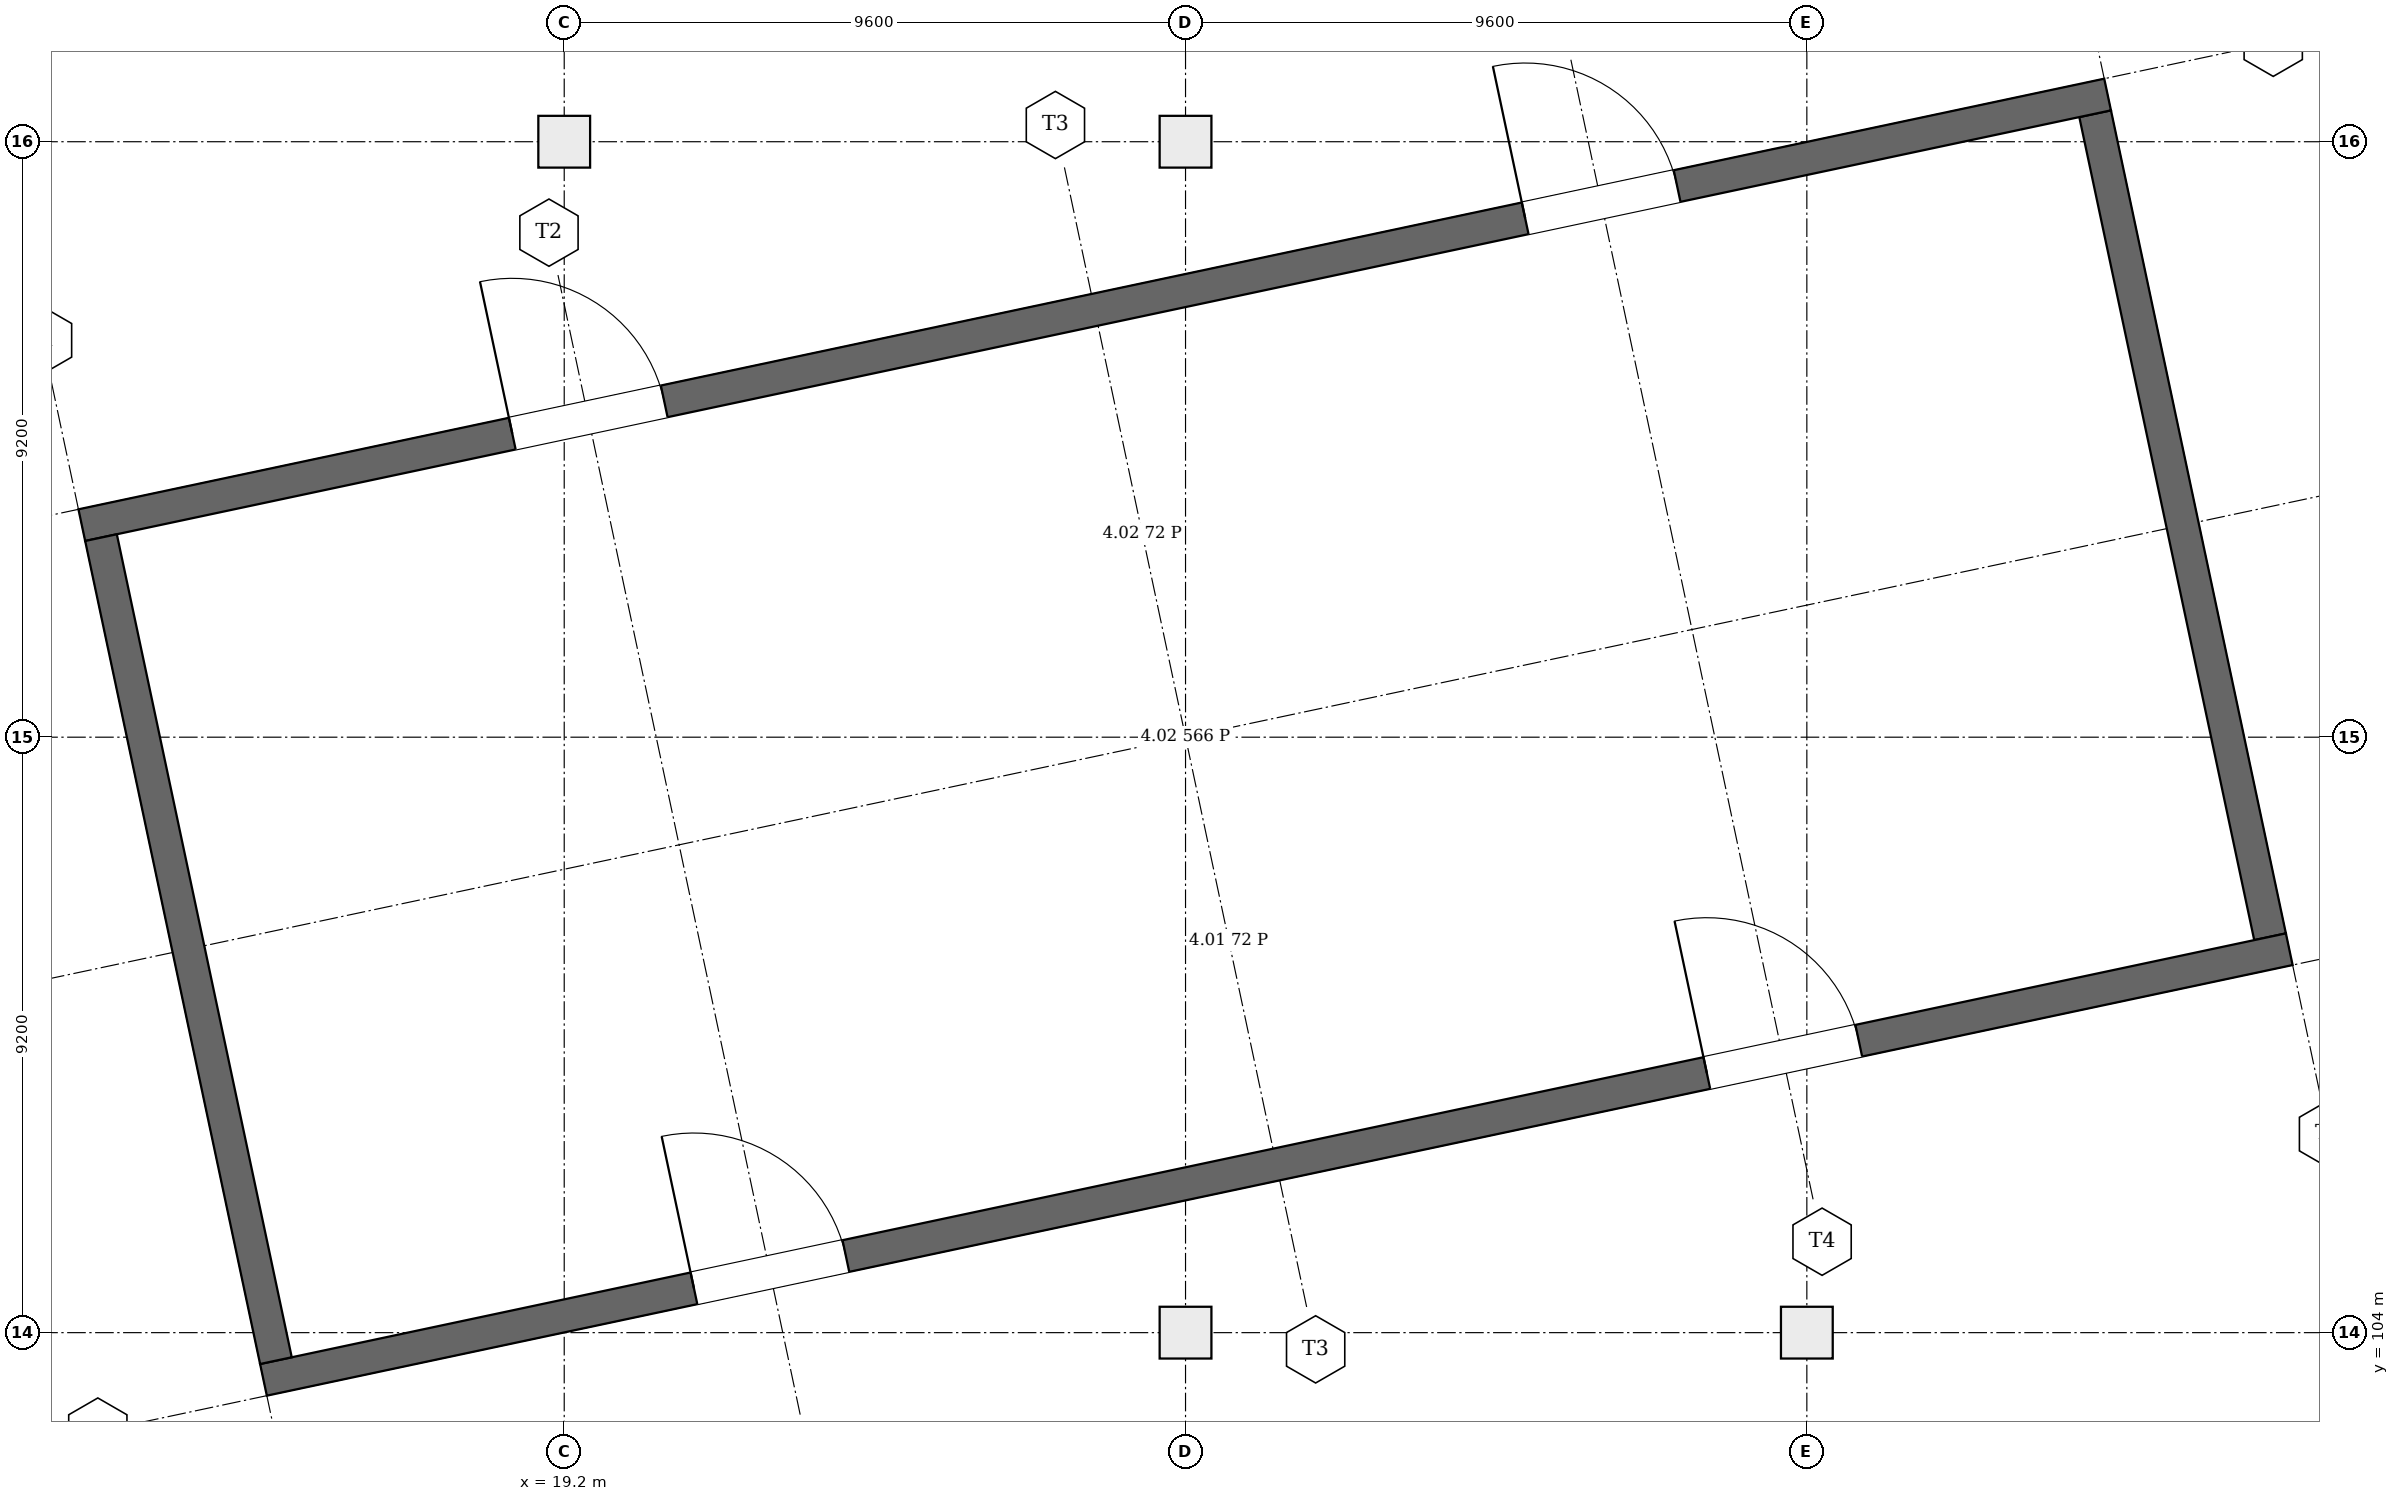
"""IFC4 building model, lengths in metres.
Left out: names, types, materials, properties, quantities, classifications, styles, units other than length and angle.
Written with IfcOpenShell. Run it as: python <this file> out.ifc"""

import sys

from ifc_helpers import new_model, si_unit, direction, frame, frame_2d, origin, origin_2d, place, context, subcontext, project, spatial, rectangle, extrude, element, fill, save


model = new_model("IFC4")
c1 = context("Model", 3, precision=1e-05, world=origin(), true_north=direction((0.0, 1.0)))
c2 = subcontext(c1, "Body", "Model", "MODEL_VIEW")
j1 = project(units=[si_unit("LENGTHUNIT", "METRE"), si_unit("PLANEANGLEUNIT", "RADIAN")], contexts=[c1])
p1 = place(None, origin())
s1 = spatial("IfcSite", under=j1, at=p1, CompositionType="ELEMENT")
p2 = place(p1, origin())
s2 = spatial("IfcBuilding", under=s1, at=p2, CompositionType="ELEMENT")
p3 = place(p2, frame((0.0, 0.0, 26.7)))
s3 = spatial("IfcBuildingStorey", under=s2, at=p3, CompositionType="ELEMENT", Elevation=26.7)
p4 = place(p3, frame((14.553, 103.271, 0.0), z_axis=(0.0, 0.0, 1.0), x_axis=(0.978148301511, 0.207908393895, 0.0)))
e1 = element("IfcWall", 1, at=p4, inside=s3, PredefinedType="SHEAR", context=c2, shape_type="SweptSolid", body=[
    extrude(rectangle(XDim=32.0, YDim=0.5, at=frame_2d((16.0, 0.0))), origin(), (0.0, 0.0, 1.0), 5.2),
])
p5 = place(p4, frame((6.8, 0.0, 0.0)))
e2 = element("IfcOpeningElement", 2, at=p5, cuts=e1, PredefinedType="OPENING", context=c2, shape_type="SweptSolid", body=[
    extrude(rectangle(XDim=2.4, YDim=2.4, at=frame_2d((1.2, 1.2))), frame((0.0, 0.26, 0.0), z_axis=(0.0, -1.0, 0.0), x_axis=(1.0, 0.0, 0.0)), (0.0, 0.0, 1.0), 0.52),
])
p6 = place(p4, frame((22.8, 0.0, 0.0)))
e3 = element("IfcOpeningElement", 3, at=p6, cuts=e1, PredefinedType="OPENING", context=c2, shape_type="SweptSolid", body=[
    extrude(rectangle(XDim=2.4, YDim=2.4, at=frame_2d((1.2, 1.2))), frame((0.0, 0.26, 0.0), z_axis=(0.0, -1.0, 0.0), x_axis=(1.0, 0.0, 0.0)), (0.0, 0.0, 1.0), 0.52),
])
p7 = place(p3, frame((11.746, 116.476, 0.0), z_axis=(0.0, 0.0, 1.0), x_axis=(0.978146420121, 0.207917245089, 0.0)))
e4 = element("IfcWall", 4, at=p7, inside=s3, PredefinedType="SHEAR", context=c2, shape_type="SweptSolid", body=[
    extrude(rectangle(XDim=32.0, YDim=0.5, at=frame_2d((16.0, 0.0))), origin(), (0.0, 0.0, 1.0), 5.2),
])
p8 = place(p7, frame((6.8, 0.0, 0.0)))
e5 = element("IfcOpeningElement", 5, at=p8, cuts=e4, PredefinedType="OPENING", context=c2, shape_type="SweptSolid", body=[
    extrude(rectangle(XDim=2.4, YDim=2.4, at=frame_2d((1.2, 1.2))), frame((0.0, 0.26, 0.0), z_axis=(0.0, -1.0, 0.0), x_axis=(1.0, 0.0, 0.0)), (0.0, 0.0, 1.0), 0.52),
])
p9 = place(p7, frame((22.8, 0.0, 0.0)))
e6 = element("IfcOpeningElement", 6, at=p9, cuts=e4, PredefinedType="OPENING", context=c2, shape_type="SweptSolid", body=[
    extrude(rectangle(XDim=2.4, YDim=2.4, at=frame_2d((1.2, 1.2))), frame((0.0, 0.26, 0.0), z_axis=(0.0, -1.0, 0.0), x_axis=(1.0, 0.0, 0.0)), (0.0, 0.0, 1.0), 0.52),
])
p10 = place(p3, frame((14.746, 103.567, 0.0), z_axis=(0.0, 0.0, 1.0), x_axis=(-0.207911537827, 0.978147633253, 0.0)))
e7 = element("IfcWall", 7, at=p10, inside=s3, PredefinedType="SHEAR", context=c2, shape_type="SweptSolid", body=[
    extrude(rectangle(XDim=13.0, YDim=0.5, at=frame_2d((6.5, 0.0))), origin(), (0.0, 0.0, 1.0), 5.2),
])
p11 = place(p3, frame((45.557, 110.117, 0.0), z_axis=(0.0, 0.0, 1.0), x_axis=(-0.207915357117, 0.978146821431, 0.0)))
e8 = element("IfcWall", 8, at=p11, inside=s3, PredefinedType="SHEAR", context=c2, shape_type="SweptSolid", body=[
    extrude(rectangle(XDim=13.0, YDim=0.5, at=frame_2d((6.5, 0.0))), origin(), (0.0, 0.0, 1.0), 5.2),
])
for number, where, z_axis, x_axis in (
    (9, (28.8, 104.0, 0.0), (0.0, 0.0, 1.0), (1.0, 0.0, 0.0)),
    (10, (38.4, 104.0, 0.0), (0.0, 0.0, 1.0), (1.0, 0.0, 0.0)),
    (11, (19.2, 122.4, 0.0), (0.0, 0.0, 1.0), (1.0, 0.0, 0.0)),
    (12, (28.8, 122.4, 0.0), (0.0, 0.0, 1.0), (1.0, 0.0, 0.0)),
):
    element("IfcColumn", number, at=place(p3, frame(where, z_axis=z_axis, x_axis=x_axis)), inside=s3, PredefinedType="COLUMN", context=c2, shape_type="SweptSolid", body=[
        extrude(rectangle(XDim=0.8, YDim=0.8, at=origin_2d()), origin(), (0.0, 0.0, 1.0), 5.2),
    ])
p12 = place(p5, origin())
e13 = element("IfcDoor", 13, at=p12, inside=s3, OperationType="DOUBLE_DOOR_SINGLE_SWING", PredefinedType="DOOR", context=c2, shape_type="SweptSolid", body=[
    extrude(rectangle(XDim=2.4, YDim=2.4, at=frame_2d((1.2, 1.2))), frame((0.0, 0.025, 0.0), z_axis=(0.0, -1.0, 0.0), x_axis=(1.0, 0.0, 0.0)), (0.0, 0.0, 1.0), 0.05),
])
fill(e2, e13)
p13 = place(p8, origin())
e14 = element("IfcDoor", 14, at=p13, inside=s3, OperationType="DOUBLE_DOOR_SINGLE_SWING", PredefinedType="DOOR", context=c2, shape_type="SweptSolid", body=[
    extrude(rectangle(XDim=2.4, YDim=2.4, at=frame_2d((1.2, 1.2))), frame((0.0, 0.025, 0.0), z_axis=(0.0, -1.0, 0.0), x_axis=(1.0, 0.0, 0.0)), (0.0, 0.0, 1.0), 0.05),
])
fill(e5, e14)
p14 = place(p6, origin())
e15 = element("IfcDoor", 15, at=p14, inside=s3, OperationType="DOUBLE_DOOR_SINGLE_SWING", PredefinedType="DOOR", context=c2, shape_type="SweptSolid", body=[
    extrude(rectangle(XDim=2.4, YDim=2.4, at=frame_2d((1.2, 1.2))), frame((0.0, 0.025, 0.0), z_axis=(0.0, -1.0, 0.0), x_axis=(1.0, 0.0, 0.0)), (0.0, 0.0, 1.0), 0.05),
])
fill(e3, e15)
p15 = place(p9, origin())
e16 = element("IfcDoor", 16, at=p15, inside=s3, OperationType="DOUBLE_DOOR_SINGLE_SWING", PredefinedType="DOOR", context=c2, shape_type="SweptSolid", body=[
    extrude(rectangle(XDim=2.4, YDim=2.4, at=frame_2d((1.2, 1.2))), frame((0.0, 0.025, 0.0), z_axis=(0.0, -1.0, 0.0), x_axis=(1.0, 0.0, 0.0)), (0.0, 0.0, 1.0), 0.05),
])
fill(e6, e16)
save(model, sys.argv[1])
